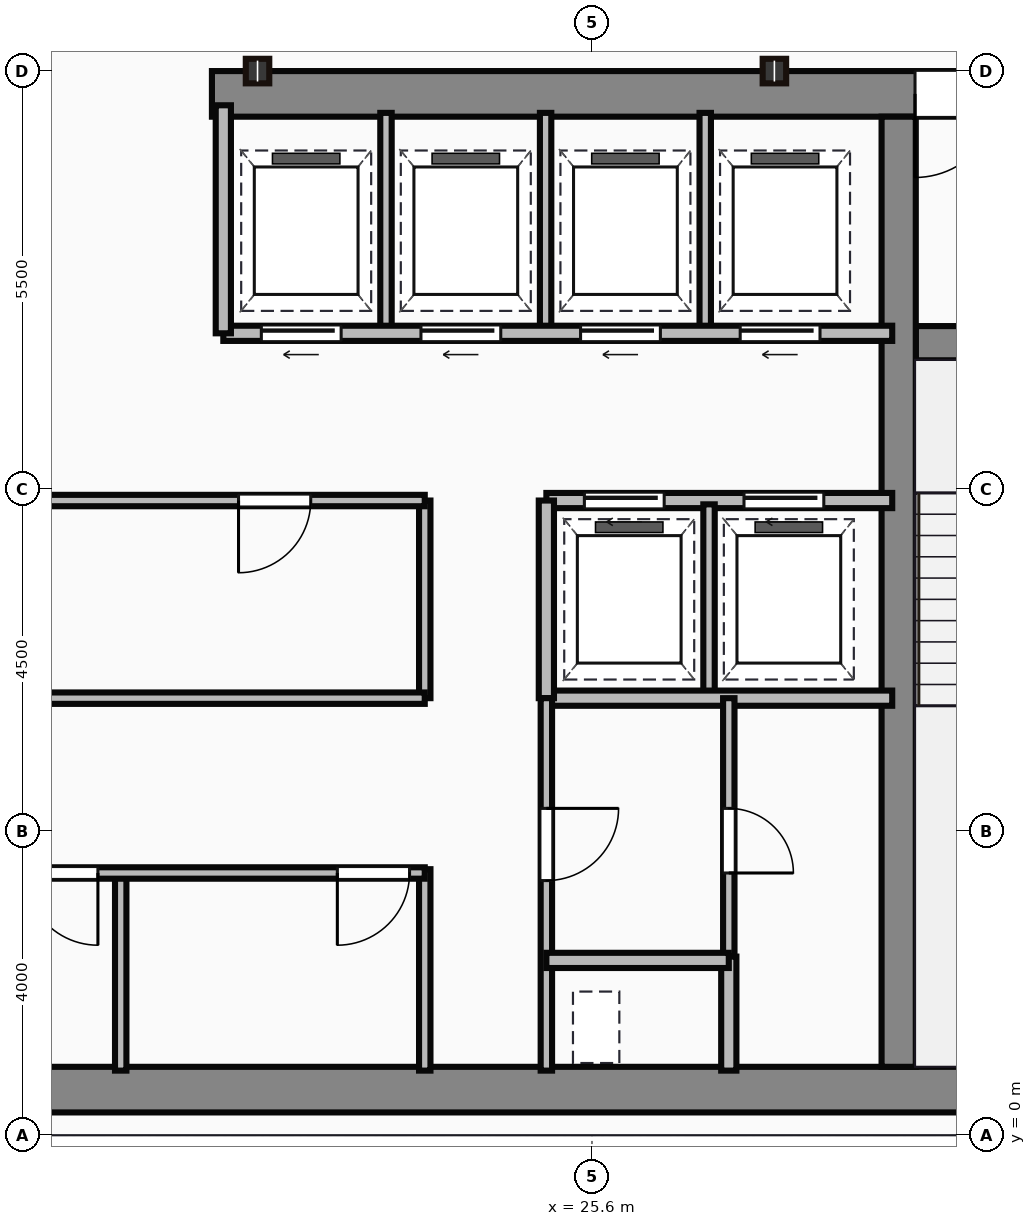
"""IFC4 building model, lengths in metres.
Left out: names, types, materials, properties, quantities, classifications, styles, units other than length and angle.
Written with IfcOpenShell. Run it as: python <this file> out.ifc"""

import sys

from ifc_helpers import new_model, si_unit, direction, frame, frame_2d, origin, origin_2d, place, context, subcontext, project, spatial, rectangle, i_section, extrude, source, transform, mapped, element, fill, save


model = new_model("IFC4")
c1 = context("Model", 3, precision=1e-05, world=origin(), true_north=direction((0.0, 1.0)))
c2 = subcontext(c1, "Body", "Model", "MODEL_VIEW")
j1 = project(units=[si_unit("LENGTHUNIT", "METRE"), si_unit("PLANEANGLEUNIT", "RADIAN")], contexts=[c1])
p1 = place(None, origin())
s1 = spatial("IfcSite", under=j1, at=p1, CompositionType="ELEMENT")
p2 = place(p1, origin())
s2 = spatial("IfcBuilding", under=s1, at=p2, CompositionType="ELEMENT")
p3 = place(p2, frame((0.0, 0.0, 221.45)))
s3 = spatial("IfcBuildingStorey", under=s2, at=p3, CompositionType="ELEMENT", Elevation=221.45)
m1 = source(origin(), c2, "Body", "SweptSolid", [
    extrude(rectangle(XDim=29.5, YDim=0.6, at=frame_2d((14.75, 0.0))), origin(), (0.0, 0.0, 1.0), 3.65),
])
p4 = place(p3, frame((4.5, 0.6, 0.0), z_axis=(0.0, 0.0, 1.0), x_axis=(1.0, 0.0, 0.0)))
e1 = element("IfcWall", 1, at=p4, inside=s3, PredefinedType="SHEAR", context=c2, shape_type="MappedRepresentation", body=[
    mapped(m1, transform((0.0, 0.0, 0.0))),
])
m2 = source(origin(), c2, "Body", "SweptSolid", [
    extrude(rectangle(XDim=12.6, YDim=0.6, at=frame_2d((6.3, 0.0))), origin(), (0.0, 0.0, 1.0), 3.65),
])
p5 = place(p3, frame((20.6, 13.7, 0.0), z_axis=(0.0, 0.0, 1.0), x_axis=(1.0, 0.0, 0.0)))
e2 = element("IfcWall", 2, at=p5, inside=s3, PredefinedType="SHEAR", context=c2, shape_type="MappedRepresentation", body=[
    mapped(m2, transform((0.0, 0.0, 0.0))),
])
p6 = place(p5, frame((9.25, 0.0, 0.0)))
e3 = element("IfcOpeningElement", 3, at=p6, cuts=e2, PredefinedType="OPENING", context=c2, shape_type="SweptSolid", body=[
    extrude(rectangle(XDim=1.1, YDim=2.15, at=frame_2d((0.55, 1.075))), frame((0.0, 0.31, 0.0), z_axis=(0.0, -1.0, 0.0), x_axis=(1.0, 0.0, 0.0)), (0.0, 0.0, 1.0), 0.62),
])
m3 = source(origin(), c2, "Body", "SweptSolid", [
    extrude(rectangle(XDim=12.5, YDim=0.45, at=frame_2d((6.25, 0.0))), origin(), (0.0, 0.0, 1.0), 3.65),
])
p7 = place(p3, frame((29.635, 0.9, 0.0), z_axis=(0.0, 0.0, 1.0), x_axis=(0.0, 1.0, 0.0)))
e4 = element("IfcWall", 4, at=p7, inside=s3, PredefinedType="SHEAR", context=c2, shape_type="MappedRepresentation", body=[
    mapped(m3, transform((0.0, 0.0, 0.0))),
])
m4 = source(origin(), c2, "Body", "SweptSolid", [
    extrude(rectangle(XDim=3.39, YDim=0.45, at=frame_2d((1.695, 0.0))), origin(), (0.0, 0.0, 1.0), 3.65),
])
p8 = place(p3, frame((29.86, 10.42, 0.0), z_axis=(0.0, 0.0, 1.0), x_axis=(1.0, 0.0, 0.0)))
e5 = element("IfcWall", 5, at=p8, inside=s3, PredefinedType="SHEAR", context=c2, shape_type="MappedRepresentation", body=[
    mapped(m4, transform((0.0, 0.0, 0.0))),
])
p9 = place(p8, frame((1.1, 0.0, 0.0)))
e6 = element("IfcOpeningElement", 6, at=p9, cuts=e5, PredefinedType="OPENING", context=c2, shape_type="SweptSolid", body=[
    extrude(rectangle(XDim=1.1, YDim=2.15, at=frame_2d((0.55, 1.075))), frame((0.0, 0.235, 0.0), z_axis=(0.0, -1.0, 0.0), x_axis=(1.0, 0.0, 0.0)), (0.0, 0.0, 1.0), 0.47),
])
m5 = source(origin(), c2, "Body", "SweptSolid", [
    extrude(i_section(OverallWidth=0.309, OverallDepth=0.323, WebThickness=0.014, FlangeThickness=0.023, at=origin_2d()), origin(), (0.0, 0.0, 1.0), 3.65),
])
for number, where, z_axis, x_axis in (
    (7, (21.2, 14.0, 0.0), (0.0, 0.0, 1.0), (1.0, 0.0, 0.0)),
    (8, (28.0, 14.0, 0.0), (0.0, 0.0, 1.0), (1.0, 0.0, 0.0)),
):
    element("IfcColumn", number, at=place(p3, frame(where, z_axis=z_axis, x_axis=x_axis)), inside=s3, PredefinedType="COLUMN", context=c2, shape_type="MappedRepresentation", body=[
        mapped(m5, transform((0.0, 0.0, 0.0))),
    ])
m6 = source(origin(), c2, "Body", "SweptSolid", [
    extrude(rectangle(XDim=10.35, YDim=0.15, at=frame_2d((5.175, 0.0))), origin(), (0.0, 0.0, 1.0), 3.4),
])
p10 = place(p3, frame((13.05, 3.45, 0.0), z_axis=(0.0, 0.0, 1.0), x_axis=(1.0, 0.0, 0.0)))
e9 = element("IfcWall", 9, at=p10, inside=s3, PredefinedType="PARTITIONING", context=c2, shape_type="MappedRepresentation", body=[
    mapped(m6, transform((0.0, 0.0, 0.0))),
])
p11 = place(p10, frame((1.1, 0.0, 0.0)))
e10 = element("IfcOpeningElement", 10, at=p11, cuts=e9, PredefinedType="OPENING", context=c2, shape_type="SweptSolid", body=[
    extrude(rectangle(XDim=0.95, YDim=2.15, at=frame_2d((0.475, 1.075))), frame((0.0, 0.085, 0.0), z_axis=(0.0, -1.0, 0.0), x_axis=(1.0, 0.0, 0.0)), (0.0, 0.0, 1.0), 0.17),
])
p12 = place(p10, frame((5.1, 0.0, 0.0)))
e11 = element("IfcOpeningElement", 11, at=p12, cuts=e9, PredefinedType="OPENING", context=c2, shape_type="SweptSolid", body=[
    extrude(rectangle(XDim=0.95, YDim=2.15, at=frame_2d((0.475, 1.075))), frame((0.0, 0.085, 0.0), z_axis=(0.0, -1.0, 0.0), x_axis=(1.0, 0.0, 0.0)), (0.0, 0.0, 1.0), 0.17),
])
p13 = place(p10, frame((9.2, 0.0, 0.0)))
e12 = element("IfcOpeningElement", 12, at=p13, cuts=e9, PredefinedType="OPENING", context=c2, shape_type="SweptSolid", body=[
    extrude(rectangle(XDim=0.95, YDim=2.15, at=frame_2d((0.475, 1.075))), frame((0.0, 0.085, 0.0), z_axis=(0.0, -1.0, 0.0), x_axis=(1.0, 0.0, 0.0)), (0.0, 0.0, 1.0), 0.17),
])
m7 = source(origin(), c2, "Body", "SweptSolid", [
    extrude(rectangle(XDim=2.65, YDim=0.15, at=frame_2d((1.325, 0.0))), origin(), (0.0, 0.0, 1.0), 3.4),
])
p14 = place(p3, frame((23.4, 0.85, 0.0), z_axis=(0.0, 0.0, 1.0), x_axis=(0.0, 1.0, 0.0)))
e13 = element("IfcWall", 13, at=p14, inside=s3, PredefinedType="PARTITIONING", context=c2, shape_type="MappedRepresentation", body=[
    mapped(m7, transform((0.0, 0.0, 0.0))),
])
m8 = source(origin(), c2, "Body", "SweptSolid", [
    extrude(rectangle(XDim=2.6, YDim=0.15, at=frame_2d((1.3, 0.0))), origin(), (0.0, 0.0, 1.0), 3.4),
])
p15 = place(p3, frame((19.4, 0.85, 0.0), z_axis=(0.0, 0.0, 1.0), x_axis=(0.0, 1.0, 0.0)))
e14 = element("IfcWall", 14, at=p15, inside=s3, PredefinedType="PARTITIONING", context=c2, shape_type="MappedRepresentation", body=[
    mapped(m8, transform((0.0, 0.0, 0.0))),
])
m9 = source(origin(), c2, "Body", "SweptSolid", [
    extrude(rectangle(XDim=11.85, YDim=0.15, at=frame_2d((5.925, 0.0))), origin(), (0.0, 0.0, 1.0), 3.4),
])
p16 = place(p3, frame((11.55, 5.75, 0.0), z_axis=(0.0, 0.0, 1.0), x_axis=(1.0, 0.0, 0.0)))
e15 = element("IfcWall", 15, at=p16, inside=s3, PredefinedType="PARTITIONING", context=c2, shape_type="MappedRepresentation", body=[
    mapped(m9, transform((0.0, 0.0, 0.0))),
])
p17 = place(p3, frame((11.55, 8.35, 0.0), z_axis=(0.0, 0.0, 1.0), x_axis=(1.0, 0.0, 0.0)))
e16 = element("IfcWall", 16, at=p17, inside=s3, PredefinedType="PARTITIONING", context=c2, shape_type="MappedRepresentation", body=[
    mapped(m9, transform((0.0, 0.0, 0.0))),
])
p18 = place(p17, frame((1.1, 0.0, 0.0)))
e17 = element("IfcOpeningElement", 17, at=p18, cuts=e16, PredefinedType="OPENING", context=c2, shape_type="SweptSolid", body=[
    extrude(rectangle(XDim=0.95, YDim=2.15, at=frame_2d((0.475, 1.075))), frame((0.0, 0.085, 0.0), z_axis=(0.0, -1.0, 0.0), x_axis=(1.0, 0.0, 0.0)), (0.0, 0.0, 1.0), 0.17),
])
p19 = place(p17, frame((9.4, 0.0, 0.0)))
e18 = element("IfcOpeningElement", 18, at=p19, cuts=e16, PredefinedType="OPENING", context=c2, shape_type="SweptSolid", body=[
    extrude(rectangle(XDim=0.95, YDim=2.15, at=frame_2d((0.475, 1.075))), frame((0.0, 0.085, 0.0), z_axis=(0.0, -1.0, 0.0), x_axis=(1.0, 0.0, 0.0)), (0.0, 0.0, 1.0), 0.17),
])
m10 = source(origin(), c2, "Body", "SweptSolid", [
    extrude(rectangle(XDim=2.6, YDim=0.15, at=frame_2d((1.3, 0.0))), origin(), (0.0, 0.0, 1.0), 3.4),
])
p20 = place(p3, frame((23.4, 5.75, 0.0), z_axis=(0.0, 0.0, 1.0), x_axis=(0.0, 1.0, 0.0)))
e19 = element("IfcWall", 19, at=p20, inside=s3, PredefinedType="PARTITIONING", context=c2, shape_type="MappedRepresentation", body=[
    mapped(m10, transform((0.0, 0.0, 0.0))),
])
m11 = source(origin(), c2, "Body", "SweptSolid", [
    extrude(rectangle(XDim=8.8, YDim=0.2, at=frame_2d((4.4, 0.0))), origin(), (0.0, 0.0, 1.0), 3.4),
])
p21 = place(p3, frame((20.75, 10.55, 0.0), z_axis=(0.0, 0.0, 1.0), x_axis=(1.0, 0.0, 0.0)))
e20 = element("IfcWall", 20, at=p21, inside=s3, PredefinedType="PARTITIONING", context=c2, shape_type="MappedRepresentation", body=[
    mapped(m11, transform((0.0, 0.0, 0.0))),
])
p22 = place(p21, frame((0.5, 0.0, 0.0)))
e21 = element("IfcOpeningElement", 21, at=p22, cuts=e20, PredefinedType="OPENING", context=c2, shape_type="SweptSolid", body=[
    extrude(rectangle(XDim=1.05, YDim=2.15, at=frame_2d((0.525, 1.075))), frame((0.0, 0.11, 0.0), z_axis=(0.0, -1.0, 0.0), x_axis=(1.0, 0.0, 0.0)), (0.0, 0.0, 1.0), 0.22),
])
p23 = place(p21, frame((2.6, 0.0, 0.0)))
e22 = element("IfcOpeningElement", 22, at=p23, cuts=e20, PredefinedType="OPENING", context=c2, shape_type="SweptSolid", body=[
    extrude(rectangle(XDim=1.05, YDim=2.15, at=frame_2d((0.525, 1.075))), frame((0.0, 0.11, 0.0), z_axis=(0.0, -1.0, 0.0), x_axis=(1.0, 0.0, 0.0)), (0.0, 0.0, 1.0), 0.22),
])
p24 = place(p21, frame((4.7, 0.0, 0.0)))
e23 = element("IfcOpeningElement", 23, at=p24, cuts=e20, PredefinedType="OPENING", context=c2, shape_type="SweptSolid", body=[
    extrude(rectangle(XDim=1.05, YDim=2.15, at=frame_2d((0.525, 1.075))), frame((0.0, 0.11, 0.0), z_axis=(0.0, -1.0, 0.0), x_axis=(1.0, 0.0, 0.0)), (0.0, 0.0, 1.0), 0.22),
])
p25 = place(p21, frame((6.8, 0.0, 0.0)))
e24 = element("IfcOpeningElement", 24, at=p25, cuts=e20, PredefinedType="OPENING", context=c2, shape_type="SweptSolid", body=[
    extrude(rectangle(XDim=1.05, YDim=2.15, at=frame_2d((0.525, 1.075))), frame((0.0, 0.11, 0.0), z_axis=(0.0, -1.0, 0.0), x_axis=(1.0, 0.0, 0.0)), (0.0, 0.0, 1.0), 0.22),
])
m12 = source(origin(), c2, "Body", "SweptSolid", [
    extrude(rectangle(XDim=3.0, YDim=0.2, at=frame_2d((1.5, 0.0))), origin(), (0.0, 0.0, 1.0), 3.4),
])
p26 = place(p3, frame((20.75, 10.55, 0.0), z_axis=(0.0, 0.0, 1.0), x_axis=(0.0, 1.0, 0.0)))
e25 = element("IfcWall", 25, at=p26, inside=s3, PredefinedType="PARTITIONING", context=c2, shape_type="MappedRepresentation", body=[
    mapped(m12, transform((0.0, 0.0, 0.0))),
])
m13 = source(origin(), c2, "Body", "SweptSolid", [
    extrude(rectangle(XDim=2.85, YDim=0.15, at=frame_2d((1.425, 0.0))), origin(), (0.0, 0.0, 1.0), 3.4),
])
for number, where, z_axis, x_axis in (
    (26, (22.89, 10.6, 0.0), (0.0, 0.0, 1.0), (0.0, 1.0, 0.0)),
    (27, (24.99, 10.6, 0.0), (0.0, 0.0, 1.0), (0.0, 1.0, 0.0)),
    (28, (27.09, 10.6, 0.0), (0.0, 0.0, 1.0), (0.0, 1.0, 0.0)),
):
    element("IfcWall", number, at=place(p3, frame(where, z_axis=z_axis, x_axis=x_axis)), inside=s3, PredefinedType="PARTITIONING", context=c2, shape_type="MappedRepresentation", body=[
        mapped(m13, transform((0.0, 0.0, 0.0))),
    ])
m14 = source(origin(), c2, "Body", "SweptSolid", [
    extrude(rectangle(XDim=4.55, YDim=0.2, at=frame_2d((2.275, 0.0))), origin(), (0.0, 0.0, 1.0), 3.4),
])
p27 = place(p3, frame((25.0, 8.35, 0.0), z_axis=(0.0, 0.0, 1.0), x_axis=(1.0, 0.0, 0.0)))
e29 = element("IfcWall", 29, at=p27, inside=s3, PredefinedType="PARTITIONING", context=c2, shape_type="MappedRepresentation", body=[
    mapped(m14, transform((0.0, 0.0, 0.0))),
])
p28 = place(p27, frame((0.5, 0.0, 0.0)))
e30 = element("IfcOpeningElement", 30, at=p28, cuts=e29, PredefinedType="OPENING", context=c2, shape_type="SweptSolid", body=[
    extrude(rectangle(XDim=1.05, YDim=2.15, at=frame_2d((0.525, 1.075))), frame((0.0, 0.11, 0.0), z_axis=(0.0, -1.0, 0.0), x_axis=(1.0, 0.0, 0.0)), (0.0, 0.0, 1.0), 0.22),
])
p29 = place(p27, frame((2.6, 0.0, 0.0)))
e31 = element("IfcOpeningElement", 31, at=p29, cuts=e29, PredefinedType="OPENING", context=c2, shape_type="SweptSolid", body=[
    extrude(rectangle(XDim=1.05, YDim=2.15, at=frame_2d((0.525, 1.075))), frame((0.0, 0.11, 0.0), z_axis=(0.0, -1.0, 0.0), x_axis=(1.0, 0.0, 0.0)), (0.0, 0.0, 1.0), 0.22),
])
p30 = place(p3, frame((25.0, 5.75, 0.0), z_axis=(0.0, 0.0, 1.0), x_axis=(1.0, 0.0, 0.0)))
e32 = element("IfcWall", 32, at=p30, inside=s3, PredefinedType="PARTITIONING", context=c2, shape_type="MappedRepresentation", body=[
    mapped(m14, transform((0.0, 0.0, 0.0))),
])
m15 = source(origin(), c2, "Body", "SweptSolid", [
    extrude(rectangle(XDim=2.6, YDim=0.2, at=frame_2d((1.3, 0.0))), origin(), (0.0, 0.0, 1.0), 3.4),
])
p31 = place(p3, frame((25.0, 5.75, 0.0), z_axis=(0.0, 0.0, 1.0), x_axis=(0.0, 1.0, 0.0)))
e33 = element("IfcWall", 33, at=p31, inside=s3, PredefinedType="PARTITIONING", context=c2, shape_type="MappedRepresentation", body=[
    mapped(m15, transform((0.0, 0.0, 0.0))),
])
m16 = source(origin(), c2, "Body", "SweptSolid", [
    extrude(rectangle(XDim=2.5, YDim=0.15, at=frame_2d((1.25, 0.0))), origin(), (0.0, 0.0, 1.0), 3.4),
])
p32 = place(p3, frame((27.14, 5.8, 0.0), z_axis=(0.0, 0.0, 1.0), x_axis=(0.0, 1.0, 0.0)))
e34 = element("IfcWall", 34, at=p32, inside=s3, PredefinedType="PARTITIONING", context=c2, shape_type="MappedRepresentation", body=[
    mapped(m16, transform((0.0, 0.0, 0.0))),
])
m17 = source(origin(), c2, "Body", "SweptSolid", [
    extrude(rectangle(XDim=4.9, YDim=0.15, at=frame_2d((2.45, 0.0))), origin(), (0.0, 0.0, 1.0), 3.4),
])
p33 = place(p3, frame((25.0, 0.85, 0.0), z_axis=(0.0, 0.0, 1.0), x_axis=(0.0, 1.0, 0.0)))
e35 = element("IfcWall", 35, at=p33, inside=s3, PredefinedType="PARTITIONING", context=c2, shape_type="MappedRepresentation", body=[
    mapped(m17, transform((0.0, 0.0, 0.0))),
])
p34 = place(p33, frame((2.5, 0.0, 0.0)))
e36 = element("IfcOpeningElement", 36, at=p34, cuts=e35, PredefinedType="OPENING", context=c2, shape_type="SweptSolid", body=[
    extrude(rectangle(XDim=0.95, YDim=2.15, at=frame_2d((0.475, 1.075))), frame((0.0, 0.085, 0.0), z_axis=(0.0, -1.0, 0.0), x_axis=(1.0, 0.0, 0.0)), (0.0, 0.0, 1.0), 0.17),
])
m18 = source(origin(), c2, "Body", "SweptSolid", [
    extrude(rectangle(XDim=2.4, YDim=0.2, at=frame_2d((1.2, 0.0))), origin(), (0.0, 0.0, 1.0), 3.4),
])
p35 = place(p3, frame((25.0, 2.3, 0.0), z_axis=(0.0, 0.0, 1.0), x_axis=(1.0, 0.0, 0.0)))
e37 = element("IfcWall", 37, at=p35, inside=s3, PredefinedType="PARTITIONING", context=c2, shape_type="MappedRepresentation", body=[
    mapped(m18, transform((0.0, 0.0, 0.0))),
])
m19 = source(origin(), c2, "Body", "SweptSolid", [
    extrude(rectangle(XDim=1.5, YDim=0.2, at=frame_2d((0.75, 0.0))), origin(), (0.0, 0.0, 1.0), 3.4),
])
p36 = place(p3, frame((27.4, 0.85, 0.0), z_axis=(0.0, 0.0, 1.0), x_axis=(0.0, 1.0, 0.0)))
e38 = element("IfcWall", 38, at=p36, inside=s3, PredefinedType="PARTITIONING", context=c2, shape_type="MappedRepresentation", body=[
    mapped(m19, transform((0.0, 0.0, 0.0))),
])
m20 = source(origin(), c2, "Body", "SweptSolid", [
    extrude(rectangle(XDim=3.4, YDim=0.15, at=frame_2d((1.7, 0.0))), origin(), (0.0, 0.0, 1.0), 3.4),
])
p37 = place(p3, frame((27.4, 2.35, 0.0), z_axis=(0.0, 0.0, 1.0), x_axis=(0.0, 1.0, 0.0)))
e39 = element("IfcWall", 39, at=p37, inside=s3, PredefinedType="PARTITIONING", context=c2, shape_type="MappedRepresentation", body=[
    mapped(m20, transform((0.0, 0.0, 0.0))),
])
p38 = place(p37, frame((1.1, 0.0, 0.0)))
e40 = element("IfcOpeningElement", 40, at=p38, cuts=e39, PredefinedType="OPENING", context=c2, shape_type="SweptSolid", body=[
    extrude(rectangle(XDim=0.85, YDim=2.1, at=frame_2d((0.425, 1.05))), frame((0.0, 0.085, 0.0), z_axis=(0.0, -1.0, 0.0), x_axis=(1.0, 0.0, 0.0)), (0.0, 0.0, 1.0), 0.17),
])
m21 = source(origin(), c2, "Body", "SweptSolid", [
    extrude(rectangle(XDim=1.1, YDim=2.15, at=frame_2d((0.55, 1.075))), frame((0.0, 0.025, 0.0), z_axis=(0.0, -1.0, 0.0), x_axis=(1.0, 0.0, 0.0)), (0.0, 0.0, 1.0), 0.05),
])
p39 = place(p6, origin())
e41 = element("IfcDoor", 41, at=p39, inside=s3, OperationType="SINGLE_SWING_LEFT", PredefinedType="DOOR", context=c2, shape_type="MappedRepresentation", body=[
    mapped(m21, transform((0.0, 0.0, 0.0))),
])
fill(e3, e41)
m22 = source(origin(), c2, "Body", "SweptSolid", [
    extrude(rectangle(XDim=0.95, YDim=2.15, at=frame_2d((0.475, 1.075))), frame((0.0, 0.025, 0.0), z_axis=(0.0, -1.0, 0.0), x_axis=(1.0, 0.0, 0.0)), (0.0, 0.0, 1.0), 0.05),
])
p40 = place(p12, origin())
e42 = element("IfcDoor", 42, at=p40, inside=s3, OperationType="SINGLE_SWING_RIGHT", PredefinedType="DOOR", context=c2, shape_type="MappedRepresentation", body=[
    mapped(m22, transform((0.0, 0.0, 0.0))),
])
fill(e11, e42)
p41 = place(p13, origin())
e43 = element("IfcDoor", 43, at=p41, inside=s3, OperationType="SINGLE_SWING_LEFT", PredefinedType="DOOR", context=c2, shape_type="MappedRepresentation", body=[
    mapped(m22, transform((0.0, 0.0, 0.0))),
])
fill(e12, e43)
p42 = place(p19, origin())
e44 = element("IfcDoor", 44, at=p42, inside=s3, OperationType="SINGLE_SWING_LEFT", PredefinedType="DOOR", context=c2, shape_type="MappedRepresentation", body=[
    mapped(m22, transform((0.0, 0.0, 0.0))),
])
fill(e18, e44)
m23 = source(origin(), c2, "Body", "SweptSolid", [
    extrude(rectangle(XDim=1.05, YDim=2.15, at=frame_2d((0.525, 1.075))), frame((0.0, 0.025, 0.0), z_axis=(0.0, -1.0, 0.0), x_axis=(1.0, 0.0, 0.0)), (0.0, 0.0, 1.0), 0.05),
])
p43 = place(p22, frame((1.05, 0.0, 0.0), z_axis=(0.0, 0.0, 1.0), x_axis=(-1.0, 0.0, 0.0)))
e45 = element("IfcDoor", 45, at=p43, inside=s3, OperationType="SLIDING_TO_LEFT", PredefinedType="DOOR", context=c2, shape_type="MappedRepresentation", body=[
    mapped(m23, transform((0.0, 0.0, 0.0))),
])
fill(e21, e45)
p44 = place(p23, frame((1.05, 0.0, 0.0), z_axis=(0.0, 0.0, 1.0), x_axis=(-1.0, 0.0, 0.0)))
e46 = element("IfcDoor", 46, at=p44, inside=s3, OperationType="SLIDING_TO_LEFT", PredefinedType="DOOR", context=c2, shape_type="MappedRepresentation", body=[
    mapped(m23, transform((0.0, 0.0, 0.0))),
])
fill(e22, e46)
p45 = place(p24, frame((1.05, 0.0, 0.0), z_axis=(0.0, 0.0, 1.0), x_axis=(-1.0, 0.0, 0.0)))
e47 = element("IfcDoor", 47, at=p45, inside=s3, OperationType="SLIDING_TO_LEFT", PredefinedType="DOOR", context=c2, shape_type="MappedRepresentation", body=[
    mapped(m23, transform((0.0, 0.0, 0.0))),
])
fill(e23, e47)
p46 = place(p25, frame((1.05, 0.0, 0.0), z_axis=(0.0, 0.0, 1.0), x_axis=(-1.0, 0.0, 0.0)))
e48 = element("IfcDoor", 48, at=p46, inside=s3, OperationType="SLIDING_TO_LEFT", PredefinedType="DOOR", context=c2, shape_type="MappedRepresentation", body=[
    mapped(m23, transform((0.0, 0.0, 0.0))),
])
fill(e24, e48)
p47 = place(p28, origin())
e49 = element("IfcDoor", 49, at=p47, inside=s3, OperationType="SLIDING_TO_LEFT", PredefinedType="DOOR", context=c2, shape_type="MappedRepresentation", body=[
    mapped(m23, transform((0.0, 0.0, 0.0))),
])
fill(e30, e49)
p48 = place(p29, origin())
e50 = element("IfcDoor", 50, at=p48, inside=s3, OperationType="SLIDING_TO_LEFT", PredefinedType="DOOR", context=c2, shape_type="MappedRepresentation", body=[
    mapped(m23, transform((0.0, 0.0, 0.0))),
])
fill(e31, e50)
p49 = place(p34, origin())
e51 = element("IfcDoor", 51, at=p49, inside=s3, OperationType="SINGLE_SWING_RIGHT", PredefinedType="DOOR", context=c2, shape_type="MappedRepresentation", body=[
    mapped(m22, transform((0.0, 0.0, 0.0))),
])
fill(e36, e51)
m24 = source(origin(), c2, "Body", "SweptSolid", [
    extrude(rectangle(XDim=0.85, YDim=2.1, at=frame_2d((0.425, 1.05))), frame((0.0, 0.025, 0.0), z_axis=(0.0, -1.0, 0.0), x_axis=(1.0, 0.0, 0.0)), (0.0, 0.0, 1.0), 0.05),
])
p50 = place(p38, frame((0.85, 0.0, 0.0), z_axis=(0.0, 0.0, 1.0), x_axis=(-1.0, 0.0, 0.0)))
e52 = element("IfcDoor", 52, at=p50, inside=s3, OperationType="SINGLE_SWING_LEFT", PredefinedType="DOOR", context=c2, shape_type="MappedRepresentation", body=[
    mapped(m24, transform((0.0, 0.0, 0.0))),
])
fill(e40, e52)
save(model, sys.argv[1])
